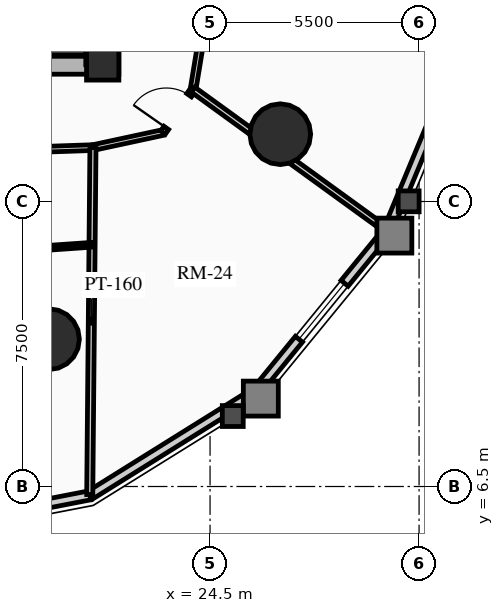
"""IFC4 building model, lengths in metres.
Left out: names, types, materials, properties, quantities, classifications, styles, units other than length and angle.
Written with IfcOpenShell. Run it as: python <this file> out.ifc"""

import sys

from ifc_helpers import new_model, si_unit, direction, frame, frame_2d, origin, origin_2d, place, context, subcontext, project, spatial, rectangle, circle, extrude, source, transform, mapped, element, fill, save


model = new_model("IFC4")
c1 = context("Model", 3, precision=1e-05, world=origin(), true_north=direction((0.0, 1.0)))
c2 = subcontext(c1, "Body", "Model", "MODEL_VIEW")
j1 = project(units=[si_unit("LENGTHUNIT", "METRE"), si_unit("PLANEANGLEUNIT", "RADIAN")], contexts=[c1])
p1 = place(None, origin())
s1 = spatial("IfcSite", under=j1, at=p1, CompositionType="ELEMENT")
p2 = place(p1, origin())
s2 = spatial("IfcBuilding", under=s1, at=p2, CompositionType="ELEMENT")
p3 = place(p2, frame((0.0, 0.0, 48.19)))
s3 = spatial("IfcBuildingStorey", under=s2, at=p3, CompositionType="ELEMENT", Elevation=48.19)
p4 = place(p3, frame((21.85, 17.35, 0.0), z_axis=(0.0, 0.0, 1.0), x_axis=(0.0, 1.0, 0.0)))
e1 = element("IfcWall", 1, at=p4, inside=s3, PredefinedType="SHEAR", context=c2, shape_type="SweptSolid", body=[
    extrude(rectangle(XDim=14.3, YDim=0.5, at=frame_2d((7.15, 0.0))), origin(), (0.0, 0.0, 1.0), 2.91),
])
p5 = place(p3, frame((11.15, 17.6, 0.0), z_axis=(0.0, 0.0, 1.0), x_axis=(1.0, 0.0, 0.0)))
e2 = element("IfcWall", 2, at=p5, inside=s3, PredefinedType="SHEAR", context=c2, shape_type="SweptSolid", body=[
    extrude(rectangle(XDim=10.7, YDim=0.5, at=frame_2d((5.35, 0.0))), origin(), (0.0, 0.0, 1.0), 2.91),
])
m1 = source(origin(), c2, "Body", "SweptSolid", [
    extrude(rectangle(XDim=1.5, YDim=2.02, at=frame_2d((0.75, 1.01))), frame((0.0, 0.26, 0.0), z_axis=(0.0, -1.0, 0.0), x_axis=(1.0, 0.0, 0.0)), (0.0, 0.0, 1.0), 0.52),
])
p6 = place(p5, frame((5.45, 0.0, 0.0)))
e3 = element("IfcOpeningElement", 3, at=p6, cuts=e2, PredefinedType="OPENING", context=c2, shape_type="MappedRepresentation", body=[
    mapped(m1, transform((0.0, 0.0, 0.0), x_axis=(1.0, 0.0, 0.0), y_axis=(0.0, 1.0, 0.0), z_axis=(0.0, 0.0, 1.0), scale=1.0)),
])
p7 = place(p3, frame((21.405, 17.6, 0.0), z_axis=(0.0, 0.0, 1.0), x_axis=(0.0, 1.0, 0.0)))
e4 = element("IfcWall", 4, at=p7, inside=s3, PredefinedType="SHEAR", context=c2, shape_type="SweptSolid", body=[
    extrude(rectangle(XDim=6.745, YDim=0.35, at=frame_2d((3.373, 0.0))), origin(), (0.0, 0.0, 1.0), 2.91),
])
p8 = place(p3, frame((21.675, 17.62, 0.0), z_axis=(0.0, 0.0, 1.0), x_axis=(1.0, 0.0, 0.0)))
e5 = element("IfcColumn", 5, at=p8, inside=s3, PredefinedType="COLUMN", context=c2, shape_type="SweptSolid", body=[
    extrude(rectangle(XDim=0.85, YDim=0.85, at=origin_2d()), origin(), (0.0, 0.0, 1.0), 2.91),
])
for number, where, z_axis, x_axis in (
    (6, (20.261, 10.377, 0.0), (0.0, 0.0, 1.0), (1.0, 0.0, 0.0)),
    (7, (26.347, 15.771, 0.0), (0.0, 0.0, 1.0), (1.0, 0.0, 0.0)),
):
    element("IfcColumn", number, at=place(p3, frame(where, z_axis=z_axis, x_axis=x_axis)), inside=s3, PredefinedType="USERDEFINED", context=c2, shape_type="SweptSolid", body=[
        extrude(circle(Radius=0.8, at=origin_2d()), origin(), (0.0, 0.0, 1.0), 2.91),
    ])
p9 = place(p3, frame((21.34, 6.268, 0.0), z_axis=(0.0, 0.0, 1.0), x_axis=(-0.981725274071, -0.190303668512, 0.0)))
e8 = element("IfcWall", 8, at=p9, inside=s3, PredefinedType="SOLIDWALL", context=c2, shape_type="SweptSolid", body=[
    extrude(rectangle(XDim=4.93, YDim=0.24, at=frame_2d((2.465, 0.0))), origin(), (0.0, 0.0, 1.0), 2.073),
])
m2 = source(origin(), c2, "Body", "SweptSolid", [
    extrude(rectangle(XDim=1.9, YDim=1.35, at=frame_2d((0.95, 0.675))), frame((0.0, 0.13, 0.0), z_axis=(0.0, -1.0, 0.0), x_axis=(1.0, 0.0, 0.0)), (0.0, 0.0, 1.0), 0.26),
])
p10 = place(p9, frame((1.515, 0.0, 0.65)))
e9 = element("IfcOpeningElement", 9, at=p10, cuts=e8, PredefinedType="OPENING", context=c2, shape_type="MappedRepresentation", body=[
    mapped(m2, transform((0.0, 0.0, 0.0), x_axis=(1.0, 0.0, 0.0), y_axis=(0.0, 1.0, 0.0), z_axis=(0.0, 0.0, 1.0), scale=1.0)),
])
p11 = place(p3, frame((25.707, 8.991, 0.0), z_axis=(0.0, 0.0, 1.0), x_axis=(-0.848533613342, -0.529141481107, 0.0)))
e10 = element("IfcWall", 10, at=p11, inside=s3, PredefinedType="SOLIDWALL", context=c2, shape_type="SweptSolid", body=[
    extrude(rectangle(XDim=5.146, YDim=0.24, at=frame_2d((2.573, 0.0))), origin(), (0.0, 0.0, 1.0), 2.073),
])
p12 = place(p3, frame((29.172, 13.232, 0.0), z_axis=(0.0, 0.0, 1.0), x_axis=(-0.632713287022, -0.77438614168, 0.0)))
e11 = element("IfcWall", 11, at=p12, inside=s3, PredefinedType="SOLIDWALL", context=c2, shape_type="SweptSolid", body=[
    extrude(rectangle(XDim=5.477, YDim=0.24, at=frame_2d((2.738, 0.0))), origin(), (0.0, 0.0, 1.0), 2.073),
])
p13 = place(p12, frame((1.788, 0.0, 0.65)))
e12 = element("IfcOpeningElement", 12, at=p13, cuts=e11, PredefinedType="OPENING", context=c2, shape_type="MappedRepresentation", body=[
    mapped(m2, transform((0.0, 0.0, 0.0), x_axis=(1.0, 0.0, 0.0), y_axis=(0.0, 1.0, 0.0), z_axis=(0.0, 0.0, 1.0), scale=1.0)),
])
p14 = place(p3, frame((31.396, 18.576, 0.0), z_axis=(0.0, 0.0, 1.0), x_axis=(-0.384348836956, -0.923187939442, 0.0)))
e13 = element("IfcWall", 13, at=p14, inside=s3, PredefinedType="SOLIDWALL", context=c2, shape_type="SweptSolid", body=[
    extrude(rectangle(XDim=5.789, YDim=0.24, at=frame_2d((2.894, 0.0))), origin(), (0.0, 0.0, 1.0), 2.073),
])
p15 = place(p3, frame((14.781, 15.191, 0.0), z_axis=(0.0, 0.0, 1.0), x_axis=(0.999412963972, 0.034259705842, 0.0)))
e14 = element("IfcWall", 14, at=p15, inside=s3, PredefinedType="PARTITIONING", context=c2, shape_type="SweptSolid", body=[
    extrude(rectangle(XDim=6.642, YDim=0.15, at=frame_2d((3.321, 0.0))), origin(), (0.0, 0.0, 1.0), 2.159),
])
p16 = place(p3, frame((21.419, 15.418, 0.0), z_axis=(0.0, 0.0, 1.0), x_axis=(0.977540384091, 0.210748184977, 0.0)))
e15 = element("IfcWall", 15, at=p16, inside=s3, PredefinedType="PARTITIONING", context=c2, shape_type="SweptSolid", body=[
    extrude(rectangle(XDim=1.887, YDim=0.15, at=frame_2d((0.944, 0.0))), origin(), (0.0, 0.0, 1.0), 2.205),
])
p17 = place(p3, frame((23.263, 15.816, 0.0), z_axis=(0.0, 0.0, 1.0), x_axis=(0.572652947117, 0.819797903241, 0.0)))
e16 = element("IfcWall", 16, at=p17, inside=s3, PredefinedType="PARTITIONING", context=c2, shape_type="SweptSolid", body=[
    extrude(rectangle(XDim=1.377, YDim=0.15, at=frame_2d((0.688, 0.0))), origin(), (0.0, 0.0, 1.0), 2.159),
])
m3 = source(origin(), c2, "Body", "SweptSolid", [
    extrude(rectangle(XDim=1.05, YDim=2.015, at=frame_2d((0.525, 1.007))), frame((0.0, 0.085, 0.0), z_axis=(0.0, -1.0, 0.0), x_axis=(1.0, 0.0, 0.0)), (0.0, 0.0, 1.0), 0.17),
])
p18 = place(p17, frame((0.147, 0.0, 0.0)))
e17 = element("IfcOpeningElement", 17, at=p18, cuts=e16, PredefinedType="OPENING", context=c2, shape_type="MappedRepresentation", body=[
    mapped(m3, transform((0.0, 0.0, 0.0), x_axis=(1.0, 0.0, 0.0), y_axis=(0.0, 1.0, 0.0), z_axis=(0.0, 0.0, 1.0), scale=1.0)),
])
p19 = place(p3, frame((24.052, 16.945, 0.0), z_axis=(0.0, 0.0, 1.0), x_axis=(0.162869842843, 0.986647563364, 0.0)))
e18 = element("IfcWall", 18, at=p19, inside=s3, PredefinedType="PARTITIONING", context=c2, shape_type="SweptSolid", body=[
    extrude(rectangle(XDim=1.605, YDim=0.15, at=frame_2d((0.803, 0.0))), origin(), (0.0, 0.0, 1.0), 2.205),
])
p20 = place(p3, frame((21.419, 15.418, 0.0), z_axis=(0.0, 0.0, 1.0), x_axis=(-0.009277675551, -0.999956961442, 0.0)))
e19 = element("IfcWall", 19, at=p20, inside=s3, PredefinedType="PARTITIONING", context=c2, shape_type="SweptSolid", body=[
    extrude(rectangle(XDim=9.131, YDim=0.16, at=frame_2d((4.566, 0.0))), origin(), (0.0, 0.0, 1.0), 2.073),
])
p21 = place(p3, frame((24.052, 16.945, 0.0), z_axis=(0.0, 0.0, 1.0), x_axis=(0.809544185493, -0.587058950817, 0.0)))
e20 = element("IfcWall", 20, at=p21, inside=s3, PredefinedType="PARTITIONING", context=c2, shape_type="SweptSolid", body=[
    extrude(rectangle(XDim=6.304, YDim=0.16, at=frame_2d((3.152, 0.0))), origin(), (0.0, 0.0, 1.0), 2.073),
])
p22 = place(p3, frame((15.262, 12.435, 0.0), z_axis=(0.0, 0.0, 1.0), x_axis=(0.997593149667, 0.069339077998, 0.0)))
e21 = element("IfcWall", 21, at=p22, inside=s3, PredefinedType="PARTITIONING", context=c2, shape_type="SweptSolid", body=[
    extrude(rectangle(XDim=6.148, YDim=0.125, at=frame_2d((3.074, 0.0))), origin(), (0.0, 0.0, 1.0), 2.159),
])
m4 = source(origin(), c2, "Body", "SweptSolid", [
    extrude(rectangle(XDim=0.9, YDim=2.005, at=frame_2d((0.45, 1.002))), frame((0.0, 0.073, 0.0), z_axis=(0.0, -1.0, 0.0), x_axis=(1.0, 0.0, 0.0)), (0.0, 0.0, 1.0), 0.145),
])
p23 = place(p22, frame((1.372, 0.0, 0.0)))
e22 = element("IfcOpeningElement", 22, at=p23, cuts=e21, PredefinedType="OPENING", context=c2, shape_type="MappedRepresentation", body=[
    mapped(m4, transform((0.0, 0.0, 0.0), x_axis=(1.0, 0.0, 0.0), y_axis=(0.0, 1.0, 0.0), z_axis=(0.0, 0.0, 1.0), scale=1.0)),
])
m5 = source(origin(), c2, "Body", "SweptSolid", [
    extrude(rectangle(XDim=1.9, YDim=1.35, at=frame_2d((0.95, 0.675))), frame((0.0, 0.03, 0.0), z_axis=(0.0, -1.0, 0.0), x_axis=(1.0, 0.0, 0.0)), (0.0, 0.0, 1.0), 0.06),
])
p24 = place(p13, origin())
e23 = element("IfcWindow", 23, at=p24, inside=s3, PartitioningType="DOUBLE_PANEL_VERTICAL", PredefinedType="WINDOW", context=c2, shape_type="MappedRepresentation", body=[
    mapped(m5, transform((0.0, 0.0, 0.0), x_axis=(1.0, 0.0, 0.0), y_axis=(0.0, 1.0, 0.0), z_axis=(0.0, 0.0, 1.0), scale=1.0)),
])
fill(e12, e23)
m6 = source(origin(), c2, "Body", "SweptSolid", [
    extrude(rectangle(XDim=1.05, YDim=2.015, at=frame_2d((0.525, 1.007))), frame((0.0, 0.025, 0.0), z_axis=(0.0, -1.0, 0.0), x_axis=(1.0, 0.0, 0.0)), (0.0, 0.0, 1.0), 0.05),
])
p25 = place(p18, origin())
e24 = element("IfcDoor", 24, at=p25, inside=s3, OperationType="SINGLE_SWING_LEFT", PredefinedType="DOOR", context=c2, shape_type="MappedRepresentation", body=[
    mapped(m6, transform((0.0, 0.0, 0.0), x_axis=(1.0, 0.0, 0.0), y_axis=(0.0, 1.0, 0.0), z_axis=(0.0, 0.0, 1.0), scale=1.0)),
])
fill(e17, e24)
save(model, sys.argv[1])
